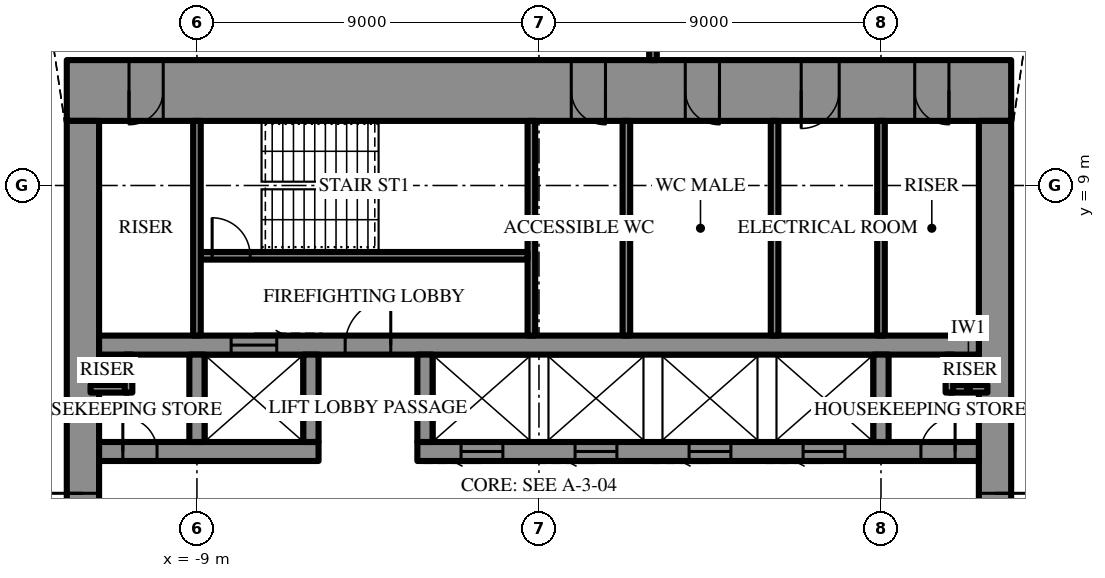
"""IFC4 building model, lengths in metres.
Left out: names, types, materials, properties, quantities, classifications, styles, units other than length and angle.
Written with IfcOpenShell. Run it as: python <this file> out.ifc"""

import sys

from ifc_helpers import new_model, si_unit, direction, frame, frame_2d, origin, place, context, subcontext, project, spatial, rectangle, extrude, element, fill, save


model = new_model("IFC4")
c1 = context("Model", 3, precision=1e-05, world=origin(), true_north=direction((0.0, 1.0)))
c2 = subcontext(c1, "Body", "Model", "MODEL_VIEW")
j1 = project(units=[si_unit("LENGTHUNIT", "METRE"), si_unit("PLANEANGLEUNIT", "RADIAN")], contexts=[c1])
p1 = place(None, origin())
s1 = spatial("IfcSite", under=j1, at=p1, CompositionType="ELEMENT")
p2 = place(p1, origin())
s2 = spatial("IfcBuilding", under=s1, at=p2, CompositionType="ELEMENT")
p3 = place(p2, frame((0.0, 0.0, 370.3)))
s3 = spatial("IfcBuildingStorey", under=s2, at=p3, CompositionType="ELEMENT", Elevation=370.3)
p4 = place(p3, frame((-12.425, 11.5, 0.0), z_axis=(0.0, 0.0, 1.0), x_axis=(1.0, 0.0, 0.0)))
e1 = element("IfcWall", 1, at=p4, inside=s3, PredefinedType="SHEAR", context=c2, shape_type="SweptSolid", body=[
    extrude(rectangle(XDim=24.85, YDim=1.6, at=frame_2d((12.425, 0.0))), origin(), (0.0, 0.0, 1.0), 4.2),
])
p5 = place(p4, frame((13.275, 0.0, 0.0)))
e2 = element("IfcOpeningElement", 2, at=p5, cuts=e1, PredefinedType="OPENING", context=c2, shape_type="SweptSolid", body=[
    extrude(rectangle(XDim=0.9, YDim=2.2, at=frame_2d((0.45, 1.1))), frame((0.0, 0.81, 0.0), z_axis=(0.0, -1.0, 0.0), x_axis=(1.0, 0.0, 0.0)), (0.0, 0.0, 1.0), 1.62),
])
p6 = place(p4, frame((16.275, 0.0, 0.0)))
e3 = element("IfcOpeningElement", 3, at=p6, cuts=e1, PredefinedType="OPENING", context=c2, shape_type="SweptSolid", body=[
    extrude(rectangle(XDim=0.9, YDim=2.2, at=frame_2d((0.45, 1.1))), frame((0.0, 0.81, 0.0), z_axis=(0.0, -1.0, 0.0), x_axis=(1.0, 0.0, 0.0)), (0.0, 0.0, 1.0), 1.62),
])
p7 = place(p4, frame((19.325, 0.0, 0.0)))
e4 = element("IfcOpeningElement", 4, at=p7, cuts=e1, PredefinedType="OPENING", context=c2, shape_type="SweptSolid", body=[
    extrude(rectangle(XDim=1.0, YDim=2.2, at=frame_2d((0.5, 1.1))), frame((0.0, 0.81, 0.0), z_axis=(0.0, -1.0, 0.0), x_axis=(1.0, 0.0, 0.0)), (0.0, 0.0, 1.0), 1.62),
])
p8 = place(p4, frame((1.637, 0.0, 0.0)))
e5 = element("IfcOpeningElement", 5, at=p8, cuts=e1, PredefinedType="OPENING", context=c2, shape_type="SweptSolid", body=[
    extrude(rectangle(XDim=0.9, YDim=2.2, at=frame_2d((0.45, 1.1))), frame((0.0, 0.81, 0.0), z_axis=(0.0, -1.0, 0.0), x_axis=(1.0, 0.0, 0.0)), (0.0, 0.0, 1.0), 1.62),
])
p9 = place(p4, frame((22.312, 0.0, 0.0)))
e6 = element("IfcOpeningElement", 6, at=p9, cuts=e1, PredefinedType="OPENING", context=c2, shape_type="SweptSolid", body=[
    extrude(rectangle(XDim=0.9, YDim=2.2, at=frame_2d((0.45, 1.1))), frame((0.0, 0.81, 0.0), z_axis=(0.0, -1.0, 0.0), x_axis=(1.0, 0.0, 0.0)), (0.0, 0.0, 1.0), 1.62),
])
p10 = place(p3, frame((12.0, -10.7, 0.0), z_axis=(0.0, 0.0, 1.0), x_axis=(0.0, 1.0, 0.0)))
e7 = element("IfcWall", 7, at=p10, inside=s3, PredefinedType="SHEAR", context=c2, shape_type="SweptSolid", body=[
    extrude(rectangle(XDim=21.4, YDim=0.85, at=frame_2d((10.7, 0.0))), origin(), (0.0, 0.0, 1.0), 4.2),
])
p11 = place(p10, frame((9.8, 0.0, 0.0)))
e8 = element("IfcOpeningElement", 8, at=p11, cuts=e7, PredefinedType="OPENING", context=c2, shape_type="SweptSolid", body=[
    extrude(rectangle(XDim=1.8, YDim=2.4, at=frame_2d((0.9, 1.2))), frame((0.0, 0.435, 0.0), z_axis=(0.0, -1.0, 0.0), x_axis=(1.0, 0.0, 0.0)), (0.0, 0.0, 1.0), 0.87),
])
p12 = place(p3, frame((-12.0, 10.7, 0.0), z_axis=(0.0, 0.0, 1.0), x_axis=(0.0, -1.0, 0.0)))
e9 = element("IfcWall", 9, at=p12, inside=s3, PredefinedType="SHEAR", context=c2, shape_type="SweptSolid", body=[
    extrude(rectangle(XDim=21.4, YDim=0.85, at=frame_2d((10.7, 0.0))), origin(), (0.0, 0.0, 1.0), 4.2),
])
p13 = place(p12, frame((9.8, 0.0, 0.0)))
e10 = element("IfcOpeningElement", 10, at=p13, cuts=e9, PredefinedType="OPENING", context=c2, shape_type="SweptSolid", body=[
    extrude(rectangle(XDim=1.8, YDim=2.4, at=frame_2d((0.9, 1.2))), frame((0.0, 0.435, 0.0), z_axis=(0.0, -1.0, 0.0), x_axis=(1.0, 0.0, 0.0)), (0.0, 0.0, 1.0), 0.87),
])
p14 = place(p3, frame((-11.575, 2.0, 0.0), z_axis=(0.0, 0.0, 1.0), x_axis=(1.0, 0.0, 0.0)))
e11 = element("IfcWall", 11, at=p14, inside=s3, PredefinedType="SHEAR", context=c2, shape_type="SweptSolid", body=[
    extrude(rectangle(XDim=5.775, YDim=0.5, at=frame_2d((2.887, 0.0))), origin(), (0.0, 0.0, 1.0), 4.2),
])
p15 = place(p14, frame((0.625, 0.0, 0.0)))
e12 = element("IfcOpeningElement", 12, at=p15, cuts=e11, PredefinedType="OPENING", context=c2, shape_type="SweptSolid", body=[
    extrude(rectangle(XDim=0.9, YDim=2.2, at=frame_2d((0.45, 1.1))), frame((0.0, 0.26, 0.0), z_axis=(0.0, -1.0, 0.0), x_axis=(1.0, 0.0, 0.0)), (0.0, 0.0, 1.0), 0.52),
])
p16 = place(p3, frame((-3.2, 2.0, 0.0), z_axis=(0.0, 0.0, 1.0), x_axis=(1.0, 0.0, 0.0)))
e13 = element("IfcWall", 13, at=p16, inside=s3, PredefinedType="SHEAR", context=c2, shape_type="SweptSolid", body=[
    extrude(rectangle(XDim=14.775, YDim=0.5, at=frame_2d((7.387, 0.0))), origin(), (0.0, 0.0, 1.0), 4.2),
])
p17 = place(p16, frame((13.25, 0.0, 0.0)))
e14 = element("IfcOpeningElement", 14, at=p17, cuts=e13, PredefinedType="OPENING", context=c2, shape_type="SweptSolid", body=[
    extrude(rectangle(XDim=0.9, YDim=2.2, at=frame_2d((0.45, 1.1))), frame((0.0, 0.26, 0.0), z_axis=(0.0, -1.0, 0.0), x_axis=(1.0, 0.0, 0.0)), (0.0, 0.0, 1.0), 0.52),
])
p18 = place(p16, frame((1.15, 0.0, 0.0)))
e15 = element("IfcOpeningElement", 15, at=p18, cuts=e13, PredefinedType="OPENING", context=c2, shape_type="SweptSolid", body=[
    extrude(rectangle(XDim=1.1, YDim=2.2, at=frame_2d((0.55, 1.1))), frame((0.0, 0.26, 0.0), z_axis=(0.0, -1.0, 0.0), x_axis=(1.0, 0.0, 0.0)), (0.0, 0.0, 1.0), 0.52),
])
p19 = place(p16, frame((4.15, 0.0, 0.0)))
e16 = element("IfcOpeningElement", 16, at=p19, cuts=e13, PredefinedType="OPENING", context=c2, shape_type="SweptSolid", body=[
    extrude(rectangle(XDim=1.1, YDim=2.2, at=frame_2d((0.55, 1.1))), frame((0.0, 0.26, 0.0), z_axis=(0.0, -1.0, 0.0), x_axis=(1.0, 0.0, 0.0)), (0.0, 0.0, 1.0), 0.52),
])
p20 = place(p16, frame((7.15, 0.0, 0.0)))
e17 = element("IfcOpeningElement", 17, at=p20, cuts=e13, PredefinedType="OPENING", context=c2, shape_type="SweptSolid", body=[
    extrude(rectangle(XDim=1.1, YDim=2.2, at=frame_2d((0.55, 1.1))), frame((0.0, 0.26, 0.0), z_axis=(0.0, -1.0, 0.0), x_axis=(1.0, 0.0, 0.0)), (0.0, 0.0, 1.0), 0.52),
])
p21 = place(p16, frame((10.15, 0.0, 0.0)))
e18 = element("IfcOpeningElement", 18, at=p21, cuts=e13, PredefinedType="OPENING", context=c2, shape_type="SweptSolid", body=[
    extrude(rectangle(XDim=1.1, YDim=2.2, at=frame_2d((0.55, 1.1))), frame((0.0, 0.26, 0.0), z_axis=(0.0, -1.0, 0.0), x_axis=(1.0, 0.0, 0.0)), (0.0, 0.0, 1.0), 0.52),
])
p22 = place(p3, frame((-11.575, 4.8, 0.0), z_axis=(0.0, 0.0, 1.0), x_axis=(1.0, 0.0, 0.0)))
e19 = element("IfcWall", 19, at=p22, inside=s3, PredefinedType="SHEAR", context=c2, shape_type="SweptSolid", body=[
    extrude(rectangle(XDim=23.15, YDim=0.5, at=frame_2d((11.575, 0.0))), origin(), (0.0, 0.0, 1.0), 4.2),
])
p23 = place(p22, frame((6.475, 0.0, 0.0)))
e20 = element("IfcOpeningElement", 20, at=p23, cuts=e19, PredefinedType="OPENING", context=c2, shape_type="SweptSolid", body=[
    extrude(rectangle(XDim=1.2, YDim=2.2, at=frame_2d((0.6, 1.1))), frame((0.0, 0.26, 0.0), z_axis=(0.0, -1.0, 0.0), x_axis=(1.0, 0.0, 0.0)), (0.0, 0.0, 1.0), 0.52),
])
p24 = place(p22, frame((3.475, 0.0, 0.0)))
e21 = element("IfcOpeningElement", 21, at=p24, cuts=e19, PredefinedType="OPENING", context=c2, shape_type="SweptSolid", body=[
    extrude(rectangle(XDim=1.2, YDim=2.2, at=frame_2d((0.6, 1.1))), frame((0.0, 0.26, 0.0), z_axis=(0.0, -1.0, 0.0), x_axis=(1.0, 0.0, 0.0)), (0.0, 0.0, 1.0), 0.52),
])
for number, where, z_axis, x_axis in (
    (22, (-9.0, 2.25, 0.0), (0.0, 0.0, 1.0), (0.0, 1.0, 0.0)),
    (23, (-6.0, 2.25, 0.0), (0.0, 0.0, 1.0), (0.0, 1.0, 0.0)),
    (24, (-3.0, 2.25, 0.0), (0.0, 0.0, 1.0), (0.0, 1.0, 0.0)),
    (25, (9.0, 2.25, 0.0), (0.0, 0.0, 1.0), (0.0, 1.0, 0.0)),
):
    element("IfcWall", number, at=place(p3, frame(where, z_axis=z_axis, x_axis=x_axis)), inside=s3, PredefinedType="SHEAR", context=c2, shape_type="SweptSolid", body=[
        extrude(rectangle(XDim=2.3, YDim=0.4, at=frame_2d((1.15, 0.0))), origin(), (0.0, 0.0, 1.0), 4.2),
    ])
p25 = place(p3, frame((-0.2, 5.05, 0.0), z_axis=(0.0, 0.0, 1.0), x_axis=(0.0, 1.0, 0.0)))
e26 = element("IfcWall", 26, at=p25, inside=s3, PredefinedType="SHEAR", context=c2, shape_type="SweptSolid", body=[
    extrude(rectangle(XDim=5.65, YDim=0.2, at=frame_2d((2.825, 0.0))), origin(), (0.0, 0.0, 1.0), 4.2),
])
p26 = place(p3, frame((-8.9, 7.15, 0.0), z_axis=(0.0, 0.0, 1.0), x_axis=(1.0, 0.0, 0.0)))
e27 = element("IfcWall", 27, at=p26, inside=s3, PredefinedType="SHEAR", context=c2, shape_type="SweptSolid", body=[
    extrude(rectangle(XDim=8.6, YDim=0.2, at=frame_2d((4.3, 0.0))), origin(), (0.0, 0.0, 1.0), 4.2),
])
p27 = place(p26, frame((0.3, 0.0, 0.0)))
e28 = element("IfcOpeningElement", 28, at=p27, cuts=e27, PredefinedType="OPENING", context=c2, shape_type="SweptSolid", body=[
    extrude(rectangle(XDim=1.0, YDim=2.2, at=frame_2d((0.5, 1.1))), frame((0.0, 0.11, 0.0), z_axis=(0.0, -1.0, 0.0), x_axis=(1.0, 0.0, 0.0)), (0.0, 0.0, 1.0), 0.22),
])
for number, where, z_axis, x_axis in (
    (29, (-9.0, 5.05, 0.0), (0.0, 0.0, 1.0), (0.0, 1.0, 0.0)),
    (30, (9.0, 5.05, 0.0), (0.0, 0.0, 1.0), (0.0, 1.0, 0.0)),
    (31, (2.3, 5.05, 0.0), (0.0, 0.0, 1.0), (0.0, 1.0, 0.0)),
    (32, (6.2, 5.05, 0.0), (0.0, 0.0, 1.0), (0.0, 1.0, 0.0)),
):
    element("IfcWall", number, at=place(p3, frame(where, z_axis=z_axis, x_axis=x_axis)), inside=s3, PredefinedType="PARTITIONING", context=c2, shape_type="SweptSolid", body=[
        extrude(rectangle(XDim=5.65, YDim=0.2, at=frame_2d((2.825, 0.0))), origin(), (0.0, 0.0, 1.0), 4.0),
    ])
for number, where, z_axis, x_axis in (
    (33, (-11.8, 3.65, 0.0), (0.0, 0.0, 1.0), (1.0, 0.0, 0.0)),
    (34, (-10.8, 3.55, 0.0), (0.0, 0.0, 1.0), (0.0, 1.0, 0.0)),
    (35, (10.8, 3.65, 0.0), (0.0, 0.0, 1.0), (1.0, 0.0, 0.0)),
    (36, (10.8, 3.55, 0.0), (0.0, 0.0, 1.0), (0.0, 1.0, 0.0)),
):
    element("IfcWall", number, at=place(p3, frame(where, z_axis=z_axis, x_axis=x_axis)), inside=s3, PredefinedType="PARTITIONING", context=c2, shape_type="SweptSolid", body=[
        extrude(rectangle(XDim=1.0, YDim=0.2, at=frame_2d((0.5, 0.0))), origin(), (0.0, 0.0, 1.0), 4.0),
    ])
p28 = place(p3, frame((3.0, 12.3, 0.0), z_axis=(0.0, 0.0, 1.0), x_axis=(0.0, 1.0, 0.0)))
e37 = element("IfcWall", 37, at=p28, inside=s3, PredefinedType="PARTITIONING", context=c2, shape_type="SweptSolid", body=[
    extrude(rectangle(XDim=1.7, YDim=0.2, at=frame_2d((0.85, 0.0))), origin(), (0.0, 0.0, 1.0), 4.0),
])
p29 = place(p28, frame((0.35, 0.0, 0.0)))
e38 = element("IfcOpeningElement", 38, at=p29, cuts=e37, PredefinedType="OPENING", context=c2, shape_type="SweptSolid", body=[
    extrude(rectangle(XDim=1.0, YDim=2.2, at=frame_2d((0.5, 1.1))), frame((0.0, 0.11, 0.0), z_axis=(0.0, -1.0, 0.0), x_axis=(1.0, 0.0, 0.0)), (0.0, 0.0, 1.0), 0.22),
])
p30 = place(p11, frame((1.8, 0.0, 0.0), z_axis=(0.0, 0.0, 1.0), x_axis=(-1.0, 0.0, 0.0)))
e39 = element("IfcDoor", 39, at=p30, inside=s3, OperationType="DOUBLE_DOOR_SINGLE_SWING", PredefinedType="DOOR", context=c2, shape_type="SweptSolid", body=[
    extrude(rectangle(XDim=1.8, YDim=2.4, at=frame_2d((0.9, 1.2))), frame((0.0, 0.025, 0.0), z_axis=(0.0, -1.0, 0.0), x_axis=(1.0, 0.0, 0.0)), (0.0, 0.0, 1.0), 0.05),
])
fill(e8, e39)
p31 = place(p13, frame((1.8, 0.0, 0.0), z_axis=(0.0, 0.0, 1.0), x_axis=(-1.0, 0.0, 0.0)))
e40 = element("IfcDoor", 40, at=p31, inside=s3, OperationType="DOUBLE_DOOR_SINGLE_SWING", PredefinedType="DOOR", context=c2, shape_type="SweptSolid", body=[
    extrude(rectangle(XDim=1.8, YDim=2.4, at=frame_2d((0.9, 1.2))), frame((0.0, 0.025, 0.0), z_axis=(0.0, -1.0, 0.0), x_axis=(1.0, 0.0, 0.0)), (0.0, 0.0, 1.0), 0.05),
])
fill(e10, e40)
p32 = place(p23, origin())
e41 = element("IfcDoor", 41, at=p32, inside=s3, OperationType="SINGLE_SWING_LEFT", PredefinedType="DOOR", context=c2, shape_type="SweptSolid", body=[
    extrude(rectangle(XDim=1.2, YDim=2.2, at=frame_2d((0.6, 1.1))), frame((0.0, 0.025, 0.0), z_axis=(0.0, -1.0, 0.0), x_axis=(1.0, 0.0, 0.0)), (0.0, 0.0, 1.0), 0.05),
])
fill(e20, e41)
p33 = place(p27, origin())
e42 = element("IfcDoor", 42, at=p33, inside=s3, OperationType="SINGLE_SWING_RIGHT", PredefinedType="DOOR", context=c2, shape_type="SweptSolid", body=[
    extrude(rectangle(XDim=1.0, YDim=2.2, at=frame_2d((0.5, 1.1))), frame((0.0, 0.025, 0.0), z_axis=(0.0, -1.0, 0.0), x_axis=(1.0, 0.0, 0.0)), (0.0, 0.0, 1.0), 0.05),
])
fill(e28, e42)
p34 = place(p5, frame((0.9, 0.0, 0.0), z_axis=(0.0, 0.0, 1.0), x_axis=(-1.0, 0.0, 0.0)))
e43 = element("IfcDoor", 43, at=p34, inside=s3, OperationType="SINGLE_SWING_RIGHT", PredefinedType="DOOR", context=c2, shape_type="SweptSolid", body=[
    extrude(rectangle(XDim=0.9, YDim=2.2, at=frame_2d((0.45, 1.1))), frame((0.0, 0.025, 0.0), z_axis=(0.0, -1.0, 0.0), x_axis=(1.0, 0.0, 0.0)), (0.0, 0.0, 1.0), 0.05),
])
fill(e2, e43)
p35 = place(p6, frame((0.9, 0.0, 0.0), z_axis=(0.0, 0.0, 1.0), x_axis=(-1.0, 0.0, 0.0)))
e44 = element("IfcDoor", 44, at=p35, inside=s3, OperationType="SINGLE_SWING_RIGHT", PredefinedType="DOOR", context=c2, shape_type="SweptSolid", body=[
    extrude(rectangle(XDim=0.9, YDim=2.2, at=frame_2d((0.45, 1.1))), frame((0.0, 0.025, 0.0), z_axis=(0.0, -1.0, 0.0), x_axis=(1.0, 0.0, 0.0)), (0.0, 0.0, 1.0), 0.05),
])
fill(e3, e44)
p36 = place(p7, frame((1.0, 0.0, 0.0), z_axis=(0.0, 0.0, 1.0), x_axis=(-1.0, 0.0, 0.0)))
e45 = element("IfcDoor", 45, at=p36, inside=s3, OperationType="SINGLE_SWING_LEFT", PredefinedType="DOOR", context=c2, shape_type="SweptSolid", body=[
    extrude(rectangle(XDim=1.0, YDim=2.2, at=frame_2d((0.5, 1.1))), frame((0.0, 0.025, 0.0), z_axis=(0.0, -1.0, 0.0), x_axis=(1.0, 0.0, 0.0)), (0.0, 0.0, 1.0), 0.05),
])
fill(e4, e45)
p37 = place(p8, frame((0.9, 0.0, 0.0), z_axis=(0.0, 0.0, 1.0), x_axis=(-1.0, 0.0, 0.0)))
e46 = element("IfcDoor", 46, at=p37, inside=s3, OperationType="SINGLE_SWING_LEFT", PredefinedType="DOOR", context=c2, shape_type="SweptSolid", body=[
    extrude(rectangle(XDim=0.9, YDim=2.2, at=frame_2d((0.45, 1.1))), frame((0.0, 0.025, 0.0), z_axis=(0.0, -1.0, 0.0), x_axis=(1.0, 0.0, 0.0)), (0.0, 0.0, 1.0), 0.05),
])
fill(e5, e46)
p38 = place(p9, frame((0.9, 0.0, 0.0), z_axis=(0.0, 0.0, 1.0), x_axis=(-1.0, 0.0, 0.0)))
e47 = element("IfcDoor", 47, at=p38, inside=s3, OperationType="SINGLE_SWING_RIGHT", PredefinedType="DOOR", context=c2, shape_type="SweptSolid", body=[
    extrude(rectangle(XDim=0.9, YDim=2.2, at=frame_2d((0.45, 1.1))), frame((0.0, 0.025, 0.0), z_axis=(0.0, -1.0, 0.0), x_axis=(1.0, 0.0, 0.0)), (0.0, 0.0, 1.0), 0.05),
])
fill(e6, e47)
p39 = place(p15, origin())
e48 = element("IfcDoor", 48, at=p39, inside=s3, OperationType="SINGLE_SWING_RIGHT", PredefinedType="DOOR", context=c2, shape_type="SweptSolid", body=[
    extrude(rectangle(XDim=0.9, YDim=2.2, at=frame_2d((0.45, 1.1))), frame((0.0, 0.025, 0.0), z_axis=(0.0, -1.0, 0.0), x_axis=(1.0, 0.0, 0.0)), (0.0, 0.0, 1.0), 0.05),
])
fill(e12, e48)
p40 = place(p17, origin())
e49 = element("IfcDoor", 49, at=p40, inside=s3, OperationType="SINGLE_SWING_LEFT", PredefinedType="DOOR", context=c2, shape_type="SweptSolid", body=[
    extrude(rectangle(XDim=0.9, YDim=2.2, at=frame_2d((0.45, 1.1))), frame((0.0, 0.025, 0.0), z_axis=(0.0, -1.0, 0.0), x_axis=(1.0, 0.0, 0.0)), (0.0, 0.0, 1.0), 0.05),
])
fill(e14, e49)
p41 = place(p24, origin())
e50 = element("IfcDoor", 50, at=p41, inside=s3, OperationType="SLIDING_TO_LEFT", PredefinedType="DOOR", context=c2, shape_type="SweptSolid", body=[
    extrude(rectangle(XDim=1.2, YDim=2.2, at=frame_2d((0.6, 1.1))), frame((0.0, 0.025, 0.0), z_axis=(0.0, -1.0, 0.0), x_axis=(1.0, 0.0, 0.0)), (0.0, 0.0, 1.0), 0.05),
])
fill(e21, e50)
p42 = place(p18, frame((1.1, 0.0, 0.0), z_axis=(0.0, 0.0, 1.0), x_axis=(-1.0, 0.0, 0.0)))
e51 = element("IfcDoor", 51, at=p42, inside=s3, OperationType="SLIDING_TO_LEFT", PredefinedType="DOOR", context=c2, shape_type="SweptSolid", body=[
    extrude(rectangle(XDim=1.1, YDim=2.2, at=frame_2d((0.55, 1.1))), frame((0.0, 0.025, 0.0), z_axis=(0.0, -1.0, 0.0), x_axis=(1.0, 0.0, 0.0)), (0.0, 0.0, 1.0), 0.05),
])
fill(e15, e51)
p43 = place(p19, frame((1.1, 0.0, 0.0), z_axis=(0.0, 0.0, 1.0), x_axis=(-1.0, 0.0, 0.0)))
e52 = element("IfcDoor", 52, at=p43, inside=s3, OperationType="SLIDING_TO_LEFT", PredefinedType="DOOR", context=c2, shape_type="SweptSolid", body=[
    extrude(rectangle(XDim=1.1, YDim=2.2, at=frame_2d((0.55, 1.1))), frame((0.0, 0.025, 0.0), z_axis=(0.0, -1.0, 0.0), x_axis=(1.0, 0.0, 0.0)), (0.0, 0.0, 1.0), 0.05),
])
fill(e16, e52)
p44 = place(p20, frame((1.1, 0.0, 0.0), z_axis=(0.0, 0.0, 1.0), x_axis=(-1.0, 0.0, 0.0)))
e53 = element("IfcDoor", 53, at=p44, inside=s3, OperationType="SLIDING_TO_LEFT", PredefinedType="DOOR", context=c2, shape_type="SweptSolid", body=[
    extrude(rectangle(XDim=1.1, YDim=2.2, at=frame_2d((0.55, 1.1))), frame((0.0, 0.025, 0.0), z_axis=(0.0, -1.0, 0.0), x_axis=(1.0, 0.0, 0.0)), (0.0, 0.0, 1.0), 0.05),
])
fill(e17, e53)
p45 = place(p21, frame((1.1, 0.0, 0.0), z_axis=(0.0, 0.0, 1.0), x_axis=(-1.0, 0.0, 0.0)))
e54 = element("IfcDoor", 54, at=p45, inside=s3, OperationType="SLIDING_TO_LEFT", PredefinedType="DOOR", context=c2, shape_type="SweptSolid", body=[
    extrude(rectangle(XDim=1.1, YDim=2.2, at=frame_2d((0.55, 1.1))), frame((0.0, 0.025, 0.0), z_axis=(0.0, -1.0, 0.0), x_axis=(1.0, 0.0, 0.0)), (0.0, 0.0, 1.0), 0.05),
])
fill(e18, e54)
save(model, sys.argv[1])
